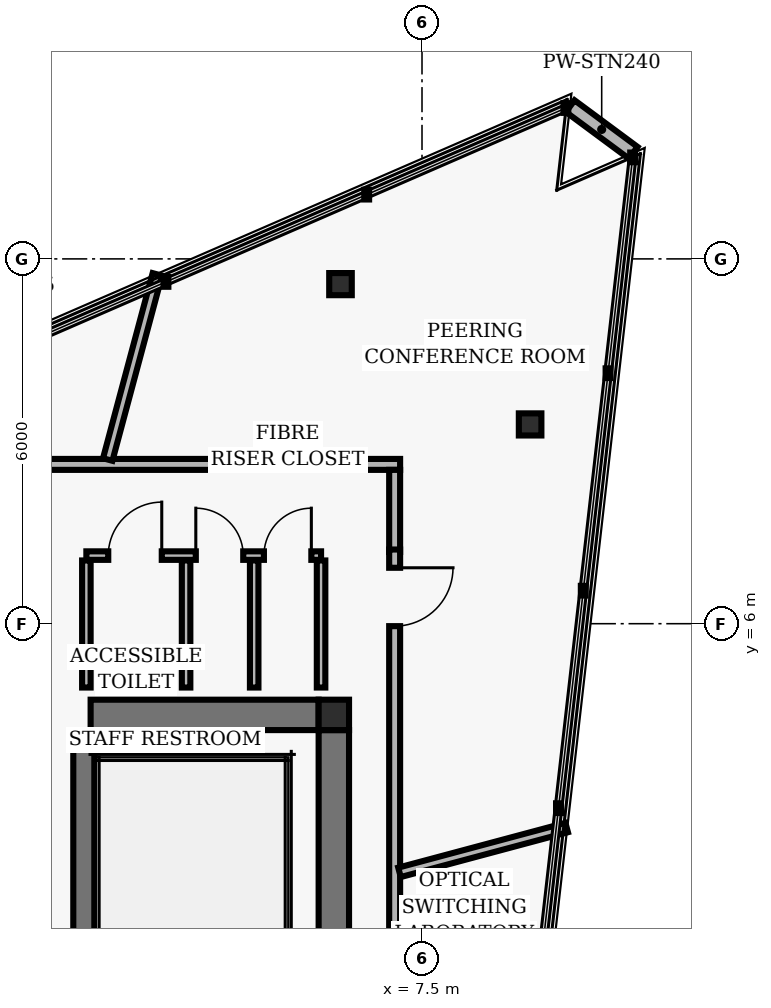
"""IFC4 building model, lengths in metres.
Left out: names, types, materials, properties, quantities, classifications, styles, units other than length and angle.
Written with IfcOpenShell. Run it as: python <this file> out.ifc"""

import sys

from ifc_helpers import new_model, si_unit, direction, frame, frame_2d, origin, origin_2d, place, context, subcontext, project, spatial, rectangle, hollow_rectangle, i_section, extrude, element, fill, save


model = new_model("IFC4")
c1 = context("Model", 3, precision=1e-05, world=origin(), true_north=direction((0.0, 1.0)))
c2 = subcontext(c1, "Body", "Model", "MODEL_VIEW")
j1 = project(units=[si_unit("LENGTHUNIT", "METRE"), si_unit("PLANEANGLEUNIT", "RADIAN")], contexts=[c1])
p1 = place(None, origin())
s1 = spatial("IfcSite", under=j1, at=p1, CompositionType="ELEMENT")
p2 = place(p1, origin())
s2 = spatial("IfcBuilding", under=s1, at=p2, CompositionType="ELEMENT")
p3 = place(p2, frame((0.0, 0.0, 246.24)))
s3 = spatial("IfcBuildingStorey", under=s2, at=p3, CompositionType="ELEMENT", Elevation=246.24)
p4 = place(p3, frame((6.05, 4.5, 0.0), z_axis=(0.0, 0.0, 1.0), x_axis=(1.0, 0.0, 0.0)))
e1 = element("IfcColumn", 1, at=p4, inside=s3, PredefinedType="COLUMN", context=c2, shape_type="SweptSolid", body=[
    extrude(hollow_rectangle(XDim=0.5, YDim=0.5, WallThickness=0.02, InnerFilletRadius=0.02, OuterFilletRadius=0.04, at=origin_2d()), origin(), (0.0, 0.0, 1.0), 2.88),
])
p5 = place(p3, frame((6.05, 0.25, 0.0), z_axis=(0.0, 0.0, 1.0), x_axis=(0.0, 1.0, 0.0)))
e2 = element("IfcWall", 2, at=p5, inside=s3, PredefinedType="SHEAR", context=c2, shape_type="SweptSolid", body=[
    extrude(rectangle(XDim=4.0, YDim=0.5, at=frame_2d((2.0, 0.0))), origin(), (0.0, 0.0, 1.0), 2.648),
])
p6 = place(p3, frame((1.94, -4.1, 0.0), z_axis=(0.0, 0.0, 1.0), x_axis=(0.0, 1.0, 0.0)))
e3 = element("IfcWall", 3, at=p6, inside=s3, PredefinedType="SHEAR", context=c2, shape_type="SweptSolid", body=[
    extrude(rectangle(XDim=8.2, YDim=0.35, at=frame_2d((4.1, 0.0))), origin(), (0.0, 0.0, 1.0), 2.648),
])
p7 = place(p3, frame((2.05, 4.5, 0.0), z_axis=(0.0, 0.0, 1.0), x_axis=(1.0, 0.0, 0.0)))
e4 = element("IfcWall", 4, at=p7, inside=s3, PredefinedType="SHEAR", context=c2, shape_type="SweptSolid", body=[
    extrude(rectangle(XDim=3.75, YDim=0.5, at=frame_2d((1.875, 0.0))), origin(), (0.0, 0.0, 1.0), 2.648),
])
for number, where, z_axis, x_axis in (
    (5, (9.278, 9.277, 0.0), (0.0, 0.0, 1.0), (1.0, 0.0, 0.0)),
    (6, (6.159, 11.585, 0.0), (0.0, 0.0, 1.0), (1.0, 0.0, 0.0)),
):
    element("IfcColumn", number, at=place(p3, frame(where, z_axis=z_axis, x_axis=x_axis)), inside=s3, PredefinedType="COLUMN", context=c2, shape_type="SweptSolid", body=[
        extrude(i_section(OverallWidth=0.371, OverallDepth=0.364, WebThickness=0.013, FlangeThickness=0.022, FilletRadius=0.015, at=origin_2d()), origin(), (0.0, 0.0, 1.0), 2.88),
    ])
p8 = place(p3, frame((10.973, 13.746, 0.0), z_axis=(0.0, 0.0, 1.0), x_axis=(-0.803782083324, 0.594923829181, 0.0)))
e7 = element("IfcWall", 7, at=p8, inside=s3, PredefinedType="PARAPET", context=c2, shape_type="SweptSolid", body=[
    extrude(rectangle(XDim=1.288, YDim=0.24, at=frame_2d((0.644, 0.0))), origin(), (0.0, 0.0, 1.0), 2.168),
])
p9 = place(p3, frame((1.98, 4.95, 0.0), z_axis=(0.0, 0.0, 1.0), x_axis=(0.0, 1.0, 0.0)))
e8 = element("IfcWall", 8, at=p9, inside=s3, PredefinedType="PARTITIONING", context=c2, shape_type="SweptSolid", body=[
    extrude(rectangle(XDim=2.09, YDim=0.14, at=frame_2d((1.045, 0.0))), origin(), (0.0, 0.0, 1.0), 2.623),
])
p10 = place(p3, frame((5.84, 4.95, 0.0), z_axis=(0.0, 0.0, 1.0), x_axis=(0.0, 1.0, 0.0)))
e9 = element("IfcWall", 9, at=p10, inside=s3, PredefinedType="PARTITIONING", context=c2, shape_type="SweptSolid", body=[
    extrude(rectangle(XDim=2.09, YDim=0.14, at=frame_2d((1.045, 0.0))), origin(), (0.0, 0.0, 1.0), 2.153),
])
p11 = place(p3, frame((1.98, 7.12, 0.0), z_axis=(0.0, 0.0, 1.0), x_axis=(1.0, 0.0, 0.0)))
e10 = element("IfcWall", 10, at=p11, inside=s3, PredefinedType="PARTITIONING", context=c2, shape_type="SweptSolid", body=[
    extrude(rectangle(XDim=3.86, YDim=0.14, at=frame_2d((1.93, 0.0))), origin(), (0.0, 0.0, 1.0), 2.623),
])
p12 = place(p11, frame((0.36, 0.0, 0.0)))
e11 = element("IfcOpeningElement", 11, at=p12, cuts=e10, PredefinedType="OPENING", context=c2, shape_type="SweptSolid", body=[
    extrude(rectangle(XDim=0.88, YDim=2.02, at=frame_2d((0.44, 1.01))), frame((0.0, 0.08, 0.0), z_axis=(0.0, -1.0, 0.0), x_axis=(1.0, 0.0, 0.0)), (0.0, 0.0, 1.0), 0.16),
])
p13 = place(p11, frame((1.8, 0.0, 0.0)))
e12 = element("IfcOpeningElement", 12, at=p13, cuts=e10, PredefinedType="OPENING", context=c2, shape_type="SweptSolid", body=[
    extrude(rectangle(XDim=0.78, YDim=2.01, at=frame_2d((0.39, 1.005))), frame((0.0, 0.08, 0.0), z_axis=(0.0, -1.0, 0.0), x_axis=(1.0, 0.0, 0.0)), (0.0, 0.0, 1.0), 0.16),
])
p14 = place(p11, frame((2.92, 0.0, 0.0)))
e13 = element("IfcOpeningElement", 13, at=p14, cuts=e10, PredefinedType="OPENING", context=c2, shape_type="SweptSolid", body=[
    extrude(rectangle(XDim=0.78, YDim=2.01, at=frame_2d((0.39, 1.005))), frame((0.0, 0.08, 0.0), z_axis=(0.0, -1.0, 0.0), x_axis=(1.0, 0.0, 0.0)), (0.0, 0.0, 1.0), 0.16),
])
for number, where, z_axis, x_axis in (
    (14, (3.62, 4.95, 0.0), (0.0, 0.0, 1.0), (0.0, 1.0, 0.0)),
    (15, (4.74, 4.95, 0.0), (0.0, 0.0, 1.0), (0.0, 1.0, 0.0)),
):
    element("IfcWall", number, at=place(p3, frame(where, z_axis=z_axis, x_axis=x_axis)), inside=s3, PredefinedType="PARTITIONING", context=c2, shape_type="SweptSolid", body=[
        extrude(rectangle(XDim=2.09, YDim=0.14, at=frame_2d((1.045, 0.0))), origin(), (0.0, 0.0, 1.0), 2.623),
    ])
p15 = place(p3, frame((-1.327, 8.62, 0.0), z_axis=(0.0, 0.0, 1.0), x_axis=(1.0, 0.0, 0.0)))
e16 = element("IfcWall", 16, at=p15, inside=s3, PredefinedType="PARTITIONING", context=c2, shape_type="SweptSolid", body=[
    extrude(rectangle(XDim=7.197, YDim=0.18, at=frame_2d((3.599, 0.0))), origin(), (0.0, 0.0, 1.0), 2.623),
])
p16 = place(p15, frame((1.478, 0.0, 0.0)))
e17 = element("IfcOpeningElement", 17, at=p16, cuts=e16, PredefinedType="OPENING", context=c2, shape_type="SweptSolid", body=[
    extrude(rectangle(XDim=0.96, YDim=2.02, at=frame_2d((0.48, 1.01))), frame((0.0, 0.1, 0.0), z_axis=(0.0, -1.0, 0.0), x_axis=(1.0, 0.0, 0.0)), (0.0, 0.0, 1.0), 0.2),
])
p17 = place(p3, frame((5.83, 8.62, 0.0), z_axis=(0.0, 0.0, 1.0), x_axis=(1.0, 0.0, 0.0)))
e18 = element("IfcWall", 18, at=p17, inside=s3, PredefinedType="PARTITIONING", context=c2, shape_type="SweptSolid", body=[
    extrude(rectangle(XDim=1.31, YDim=0.18, at=frame_2d((0.655, 0.0))), origin(), (0.0, 0.0, 1.0), 2.623),
])
p18 = place(p3, frame((7.05, 8.53, 0.0), z_axis=(0.0, 0.0, 1.0), x_axis=(0.0, -1.0, 0.0)))
e19 = element("IfcWall", 19, at=p18, inside=s3, PredefinedType="PARTITIONING", context=c2, shape_type="SweptSolid", body=[
    extrude(rectangle(XDim=1.35, YDim=0.18, at=frame_2d((0.675, 0.0))), origin(), (0.0, 0.0, 1.0), 2.623),
])
p19 = place(p3, frame((7.05, 7.22, 0.0), z_axis=(0.0, 0.0, 1.0), x_axis=(0.0, -1.0, 0.0)))
e20 = element("IfcWall", 20, at=p19, inside=s3, PredefinedType="PARTITIONING", context=c2, shape_type="SweptSolid", body=[
    extrude(rectangle(XDim=14.48, YDim=0.18, at=frame_2d((7.24, 0.0))), origin(), (0.0, 0.0, 1.0), 2.203),
])
p20 = place(p19, frame((12.019, 0.0, 0.0)))
e21 = element("IfcOpeningElement", 21, at=p20, cuts=e20, PredefinedType="OPENING", context=c2, shape_type="SweptSolid", body=[
    extrude(rectangle(XDim=1.02, YDim=2.02, at=frame_2d((0.51, 1.01))), frame((0.0, 0.1, 0.0), z_axis=(0.0, -1.0, 0.0), x_axis=(1.0, 0.0, 0.0)), (0.0, 0.0, 1.0), 0.2),
])
p21 = place(p19, frame((0.3, 0.0, 0.0)))
e22 = element("IfcOpeningElement", 22, at=p21, cuts=e20, PredefinedType="OPENING", context=c2, shape_type="SweptSolid", body=[
    extrude(rectangle(XDim=0.96, YDim=2.02, at=frame_2d((0.48, 1.01))), frame((0.0, 0.1, 0.0), z_axis=(0.0, -1.0, 0.0), x_axis=(1.0, 0.0, 0.0)), (0.0, 0.0, 1.0), 0.2),
])
p22 = place(p3, frame((7.13, 1.91, 0.0), z_axis=(0.0, 0.0, 1.0), x_axis=(0.965918188347, 0.258847548609, 0.0)))
e23 = element("IfcWall", 23, at=p22, inside=s3, PredefinedType="PARTITIONING", context=c2, shape_type="SweptSolid", body=[
    extrude(rectangle(XDim=2.846, YDim=0.16, at=frame_2d((1.423, 0.0))), origin(), (0.0, 0.0, 1.0), 2.623),
])
p23 = place(p3, frame((2.331, 8.7, 0.0), z_axis=(0.0, 0.0, 1.0), x_axis=(0.258790273714, 0.9659335351, 0.0)))
e24 = element("IfcWall", 24, at=p23, inside=s3, PredefinedType="PARTITIONING", context=c2, shape_type="SweptSolid", body=[
    extrude(rectangle(XDim=3.153, YDim=0.16, at=frame_2d((1.576, 0.0))), origin(), (0.0, 0.0, 1.0), 2.623),
])
p24 = place(p12, origin())
e25 = element("IfcDoor", 25, at=p24, inside=s3, OperationType="SINGLE_SWING_RIGHT", PredefinedType="DOOR", context=c2, shape_type="SweptSolid", body=[
    extrude(rectangle(XDim=0.88, YDim=2.02, at=frame_2d((0.44, 1.01))), frame((0.0, 0.025, 0.0), z_axis=(0.0, -1.0, 0.0), x_axis=(1.0, 0.0, 0.0)), (0.0, 0.0, 1.0), 0.05),
])
fill(e11, e25)
p25 = place(p13, origin())
e26 = element("IfcDoor", 26, at=p25, inside=s3, OperationType="SINGLE_SWING_LEFT", PredefinedType="DOOR", context=c2, shape_type="SweptSolid", body=[
    extrude(rectangle(XDim=0.78, YDim=2.01, at=frame_2d((0.39, 1.005))), frame((0.0, 0.025, 0.0), z_axis=(0.0, -1.0, 0.0), x_axis=(1.0, 0.0, 0.0)), (0.0, 0.0, 1.0), 0.05),
])
fill(e12, e26)
p26 = place(p14, origin())
e27 = element("IfcDoor", 27, at=p26, inside=s3, OperationType="SINGLE_SWING_RIGHT", PredefinedType="DOOR", context=c2, shape_type="SweptSolid", body=[
    extrude(rectangle(XDim=0.78, YDim=2.01, at=frame_2d((0.39, 1.005))), frame((0.0, 0.025, 0.0), z_axis=(0.0, -1.0, 0.0), x_axis=(1.0, 0.0, 0.0)), (0.0, 0.0, 1.0), 0.05),
])
fill(e13, e27)
p27 = place(p21, origin())
e28 = element("IfcDoor", 28, at=p27, inside=s3, OperationType="SINGLE_SWING_LEFT", PredefinedType="DOOR", context=c2, shape_type="SweptSolid", body=[
    extrude(rectangle(XDim=0.96, YDim=2.02, at=frame_2d((0.48, 1.01))), frame((0.0, 0.025, 0.0), z_axis=(0.0, -1.0, 0.0), x_axis=(1.0, 0.0, 0.0)), (0.0, 0.0, 1.0), 0.05),
])
fill(e22, e28)
save(model, sys.argv[1])
